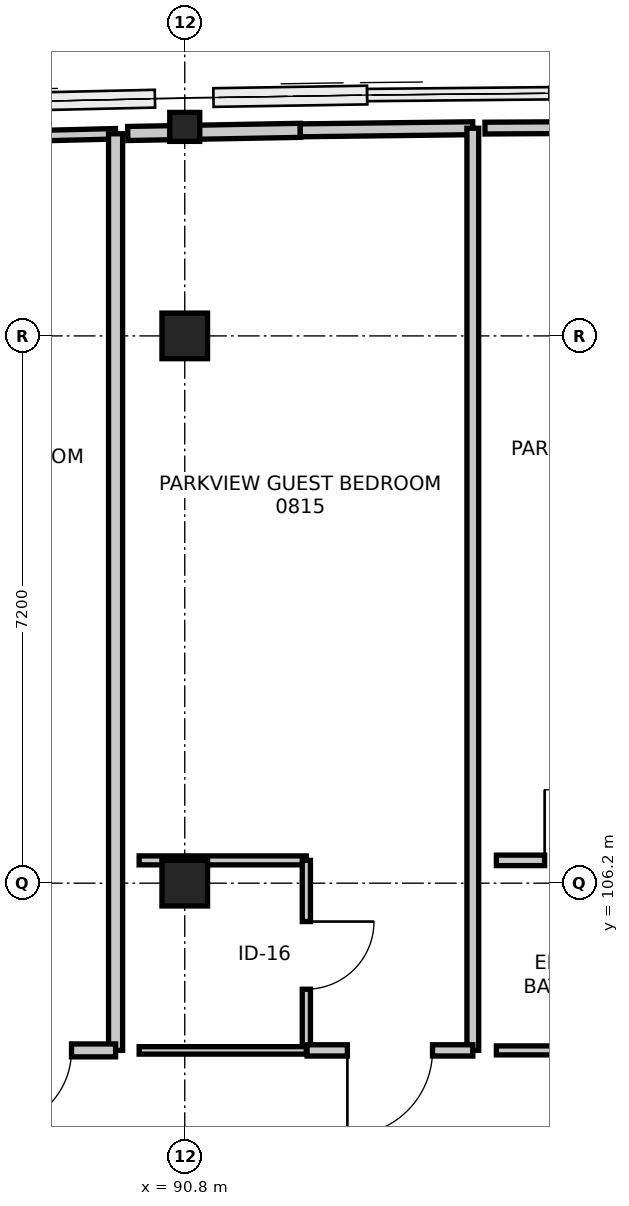
"""IFC4 building model, lengths in metres.
Left out: names, types, materials, properties, quantities, classifications, styles, units other than length and angle.
Written with IfcOpenShell. Run it as: python <this file> out.ifc"""

import sys

from ifc_helpers import new_model, si_unit, direction, frame, frame_2d, origin, origin_2d, place, context, subcontext, project, spatial, rectangle, i_section, extrude, element, fill, save


model = new_model("IFC4")
c1 = context("Model", 3, precision=1e-05, world=origin(), true_north=direction((0.0, 1.0)))
c2 = subcontext(c1, "Body", "Model", "MODEL_VIEW")
j1 = project(units=[si_unit("LENGTHUNIT", "METRE"), si_unit("PLANEANGLEUNIT", "RADIAN")], contexts=[c1])
p1 = place(None, origin())
s1 = spatial("IfcSite", under=j1, at=p1, CompositionType="ELEMENT")
p2 = place(p1, origin())
s2 = spatial("IfcBuilding", under=s1, at=p2, CompositionType="ELEMENT")
p3 = place(p2, frame((0.0, 0.0, 33.6)))
s3 = spatial("IfcBuildingStorey", under=s2, at=p3, CompositionType="ELEMENT", Elevation=33.6)
for number, where, z_axis, x_axis in (
    (1, (90.8, 106.2, 0.0), (0.0, 0.0, 1.0), (1.0, 0.0, 0.0)),
    (2, (90.8, 113.4, 0.0), (0.0, 0.0, 1.0), (1.0, 0.0, 0.0)),
):
    element("IfcColumn", number, at=place(p3, frame(where, z_axis=z_axis, x_axis=x_axis)), inside=s3, PredefinedType="COLUMN", context=c2, shape_type="SweptSolid", body=[
        extrude(rectangle(XDim=0.6, YDim=0.6, at=origin_2d()), origin(), (0.0, 0.0, 1.0), 3.6),
    ])
p4 = place(p3, frame((90.8, 116.15, 0.0), z_axis=(0.0, 0.0, 1.0), x_axis=(1.0, 0.0, 0.0)))
e3 = element("IfcColumn", 3, at=p4, inside=s3, PredefinedType="COLUMN", context=c2, shape_type="SweptSolid", body=[
    extrude(i_section(OverallWidth=0.395, OverallDepth=0.381, WebThickness=0.018, FlangeThickness=0.03, FilletRadius=0.015, at=origin_2d()), origin(), (0.0, 0.0, 1.0), 3.6),
])
p5 = place(p3, frame((87.62, 116.003, 0.0), z_axis=(0.0, 0.0, 1.0), x_axis=(0.999696780071, 0.024624132799, 0.0)))
e4 = element("IfcWall", 4, at=p5, inside=s3, PredefinedType="PARTITIONING", context=c2, shape_type="SweptSolid", body=[
    extrude(rectangle(XDim=2.271, YDim=0.138, at=frame_2d((1.135, 0.0))), origin(), (0.0, 0.0, 1.0), 2.936),
])
p6 = place(p3, frame((89.89, 116.059, 0.0), z_axis=(0.0, 0.0, 1.0), x_axis=(0.0, -1.0, 0.0)))
e5 = element("IfcWall", 5, at=p6, inside=s3, PredefinedType="PARTITIONING", context=c2, shape_type="SweptSolid", body=[
    extrude(rectangle(XDim=12.059, YDim=0.185, at=frame_2d((6.03, 0.0))), origin(), (0.0, 0.0, 1.0), 2.745),
])
p7 = place(p3, frame((89.89, 104.0, 0.0), z_axis=(0.0, 0.0, 1.0), x_axis=(-1.0, 0.0, 0.0)))
e6 = element("IfcWall", 6, at=p7, inside=s3, PredefinedType="PARTITIONING", context=c2, shape_type="SweptSolid", body=[
    extrude(rectangle(XDim=2.18, YDim=0.17, at=frame_2d((1.09, 0.0))), origin(), (0.0, 0.0, 1.0), 3.36),
])
p8 = place(p7, frame((0.58, 0.0, 0.0)))
e7 = element("IfcOpeningElement", 7, at=p8, cuts=e6, PredefinedType="OPENING", context=c2, shape_type="SweptSolid", body=[
    extrude(rectangle(XDim=1.02, YDim=2.15, at=frame_2d((0.51, 1.075))), frame((0.0, 0.095, 0.0), z_axis=(0.0, -1.0, 0.0), x_axis=(1.0, 0.0, 0.0)), (0.0, 0.0, 1.0), 0.19),
])
p9 = place(p3, frame((90.2, 106.5, 0.0), z_axis=(0.0, 0.0, 1.0), x_axis=(1.0, 0.0, 0.0)))
e8 = element("IfcWall", 8, at=p9, inside=s3, PredefinedType="PARTITIONING", context=c2, shape_type="SweptSolid", body=[
    extrude(rectangle(XDim=2.2, YDim=0.118, at=frame_2d((1.1, 0.0))), origin(), (0.0, 0.0, 1.0), 2.695),
])
p10 = place(p3, frame((92.4, 106.5, 0.0), z_axis=(0.0, 0.0, 1.0), x_axis=(0.0, -1.0, 0.0)))
e9 = element("IfcWall", 9, at=p10, inside=s3, PredefinedType="PARTITIONING", context=c2, shape_type="SweptSolid", body=[
    extrude(rectangle(XDim=2.5, YDim=0.108, at=frame_2d((1.25, 0.0))), origin(), (0.0, 0.0, 1.0), 2.745),
])
p11 = place(p10, frame((0.805, 0.0, 0.0)))
e10 = element("IfcOpeningElement", 10, at=p11, cuts=e9, PredefinedType="OPENING", context=c2, shape_type="SweptSolid", body=[
    extrude(rectangle(XDim=0.89, YDim=2.09, at=frame_2d((0.445, 1.045))), frame((0.0, 0.064, 0.0), z_axis=(0.0, -1.0, 0.0), x_axis=(1.0, 0.0, 0.0)), (0.0, 0.0, 1.0), 0.128),
])
p12 = place(p3, frame((92.4, 104.0, 0.0), z_axis=(0.0, 0.0, 1.0), x_axis=(-1.0, 0.0, 0.0)))
e11 = element("IfcWall", 11, at=p12, inside=s3, PredefinedType="PARTITIONING", context=c2, shape_type="SweptSolid", body=[
    extrude(rectangle(XDim=2.2, YDim=0.098, at=frame_2d((1.1, 0.0))), origin(), (0.0, 0.0, 1.0), 2.695),
])
p13 = place(p3, frame((90.05, 116.063, 0.0), z_axis=(0.0, 0.0, 1.0), x_axis=(0.999830927494, 0.018387942418, 0.0)))
e12 = element("IfcWall", 12, at=p13, inside=s3, PredefinedType="PARTITIONING", context=c2, shape_type="SweptSolid", body=[
    extrude(rectangle(XDim=2.271, YDim=0.185, at=frame_2d((1.135, 0.0))), origin(), (0.0, 0.0, 1.0), 2.936),
])
p14 = place(p3, frame((92.32, 116.104, 0.0), z_axis=(0.0, 0.0, 1.0), x_axis=(0.999924846076, 0.012259779786, 0.0)))
e13 = element("IfcWall", 13, at=p14, inside=s3, PredefinedType="PARTITIONING", context=c2, shape_type="SweptSolid", body=[
    extrude(rectangle(XDim=2.27, YDim=0.17, at=frame_2d((1.135, 0.0))), origin(), (0.0, 0.0, 1.0), 2.936),
])
p15 = place(p3, frame((94.59, 116.132, 0.0), z_axis=(0.0, 0.0, 1.0), x_axis=(0.0, -1.0, 0.0)))
e14 = element("IfcWall", 14, at=p15, inside=s3, PredefinedType="PARTITIONING", context=c2, shape_type="SweptSolid", body=[
    extrude(rectangle(XDim=12.132, YDim=0.155, at=frame_2d((6.066, 0.0))), origin(), (0.0, 0.0, 1.0), 2.745),
])
p16 = place(p3, frame((94.59, 104.0, 0.0), z_axis=(0.0, 0.0, 1.0), x_axis=(-1.0, 0.0, 0.0)))
e15 = element("IfcWall", 15, at=p16, inside=s3, PredefinedType="PARTITIONING", context=c2, shape_type="SweptSolid", body=[
    extrude(rectangle(XDim=2.18, YDim=0.148, at=frame_2d((1.09, 0.0))), origin(), (0.0, 0.0, 1.0), 3.36),
])
p17 = place(p16, frame((0.53, 0.0, 0.0)))
e16 = element("IfcOpeningElement", 16, at=p17, cuts=e15, PredefinedType="OPENING", context=c2, shape_type="SweptSolid", body=[
    extrude(rectangle(XDim=1.12, YDim=2.2, at=frame_2d((0.56, 1.1))), frame((0.0, 0.084, 0.0), z_axis=(0.0, -1.0, 0.0), x_axis=(1.0, 0.0, 0.0)), (0.0, 0.0, 1.0), 0.168),
])
p18 = place(p3, frame((94.9, 106.5, 0.0), z_axis=(0.0, 0.0, 1.0), x_axis=(1.0, 0.0, 0.0)))
e17 = element("IfcWall", 17, at=p18, inside=s3, PredefinedType="PARTITIONING", context=c2, shape_type="SweptSolid", body=[
    extrude(rectangle(XDim=2.2, YDim=0.138, at=frame_2d((1.1, 0.0))), origin(), (0.0, 0.0, 1.0), 3.36),
])
p19 = place(p18, frame((0.635, 0.0, 0.0)))
e18 = element("IfcOpeningElement", 18, at=p19, cuts=e17, PredefinedType="OPENING", context=c2, shape_type="SweptSolid", body=[
    extrude(rectangle(XDim=0.93, YDim=2.13, at=frame_2d((0.465, 1.065))), frame((0.0, 0.079, 0.0), z_axis=(0.0, -1.0, 0.0), x_axis=(1.0, 0.0, 0.0)), (0.0, 0.0, 1.0), 0.158),
])
p20 = place(p3, frame((97.1, 104.0, 0.0), z_axis=(0.0, 0.0, 1.0), x_axis=(-1.0, 0.0, 0.0)))
e19 = element("IfcWall", 19, at=p20, inside=s3, PredefinedType="PARTITIONING", context=c2, shape_type="SweptSolid", body=[
    extrude(rectangle(XDim=2.2, YDim=0.118, at=frame_2d((1.1, 0.0))), origin(), (0.0, 0.0, 1.0), 3.36),
])
p21 = place(p3, frame((94.75, 116.134, 0.0), z_axis=(0.0, 0.0, 1.0), x_axis=(0.999983754538, 0.005700057968, 0.0)))
e20 = element("IfcWall", 20, at=p21, inside=s3, PredefinedType="PARTITIONING", context=c2, shape_type="SweptSolid", body=[
    extrude(rectangle(XDim=2.27, YDim=0.155, at=frame_2d((1.135, 0.0))), origin(), (0.0, 0.0, 1.0), 2.936),
])
p22 = place(p8, origin())
e21 = element("IfcDoor", 21, at=p22, inside=s3, OperationType="SINGLE_SWING_RIGHT", PredefinedType="DOOR", context=c2, shape_type="SweptSolid", body=[
    extrude(rectangle(XDim=1.02, YDim=2.15, at=frame_2d((0.51, 1.075))), frame((0.0, 0.025, 0.0), z_axis=(0.0, -1.0, 0.0), x_axis=(1.0, 0.0, 0.0)), (0.0, 0.0, 1.0), 0.05),
])
fill(e7, e21)
p23 = place(p11, origin())
e22 = element("IfcDoor", 22, at=p23, inside=s3, OperationType="SINGLE_SWING_LEFT", PredefinedType="DOOR", context=c2, shape_type="SweptSolid", body=[
    extrude(rectangle(XDim=0.89, YDim=2.09, at=frame_2d((0.445, 1.045))), frame((0.0, 0.025, 0.0), z_axis=(0.0, -1.0, 0.0), x_axis=(1.0, 0.0, 0.0)), (0.0, 0.0, 1.0), 0.05),
])
fill(e10, e22)
p24 = place(p17, origin())
e23 = element("IfcDoor", 23, at=p24, inside=s3, OperationType="SINGLE_SWING_RIGHT", PredefinedType="DOOR", context=c2, shape_type="SweptSolid", body=[
    extrude(rectangle(XDim=1.12, YDim=2.2, at=frame_2d((0.56, 1.1))), frame((0.0, 0.025, 0.0), z_axis=(0.0, -1.0, 0.0), x_axis=(1.0, 0.0, 0.0)), (0.0, 0.0, 1.0), 0.05),
])
fill(e16, e23)
p25 = place(p19, origin())
e24 = element("IfcDoor", 24, at=p25, inside=s3, OperationType="SINGLE_SWING_LEFT", PredefinedType="DOOR", context=c2, shape_type="SweptSolid", body=[
    extrude(rectangle(XDim=0.93, YDim=2.13, at=frame_2d((0.465, 1.065))), frame((0.0, 0.025, 0.0), z_axis=(0.0, -1.0, 0.0), x_axis=(1.0, 0.0, 0.0)), (0.0, 0.0, 1.0), 0.05),
])
fill(e18, e24)
save(model, sys.argv[1])
